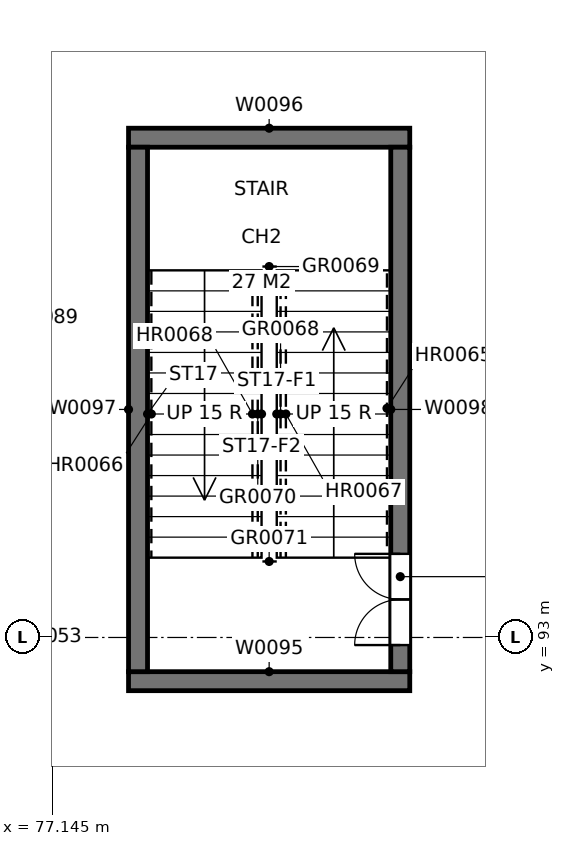
"""IFC4 building model, lengths in metres.
Left out: names, types, materials, properties, quantities, classifications, styles, units other than length and angle.
Written with IfcOpenShell. Run it as: python <this file> out.ifc"""

import sys

from ifc_helpers import new_model, si_unit, direction, frame, frame_2d, origin, place, context, subcontext, project, spatial, rectangle, extrude, element, fill, save


model = new_model("IFC4")
c1 = context("Model", 3, precision=1e-05, world=origin(), true_north=direction((0.0, 1.0)))
c2 = subcontext(c1, "Body", "Model", "MODEL_VIEW")
j1 = project(units=[si_unit("LENGTHUNIT", "METRE"), si_unit("PLANEANGLEUNIT", "RADIAN")], contexts=[c1])
p1 = place(None, origin())
s1 = spatial("IfcSite", under=j1, at=p1, CompositionType="ELEMENT")
p2 = place(p1, origin())
s2 = spatial("IfcBuilding", under=s1, at=p2, CompositionType="ELEMENT")
p3 = place(p2, frame((0.0, 0.0, 9.6)))
s3 = spatial("IfcBuildingStorey", under=s2, at=p3, CompositionType="ELEMENT", Elevation=9.6)
for number, where, z_axis, x_axis in (
    (1, (78.15, 92.425, 0.0), (0.0, 0.0, 1.0), (1.0, 0.0, 0.0)),
    (2, (78.15, 99.575, 0.0), (0.0, 0.0, 1.0), (1.0, 0.0, 0.0)),
):
    element("IfcWall", number, at=place(p3, frame(where, z_axis=z_axis, x_axis=x_axis)), inside=s3, PredefinedType="SOLIDWALL", context=c2, shape_type="SweptSolid", body=[
        extrude(rectangle(XDim=3.7, YDim=0.25, at=frame_2d((1.85, 0.0))), origin(), (0.0, 0.0, 1.0), 4.8),
    ])
p4 = place(p3, frame((78.275, 92.55, 0.0), z_axis=(0.0, 0.0, 1.0), x_axis=(0.0, 1.0, 0.0)))
e3 = element("IfcWall", 3, at=p4, inside=s3, PredefinedType="SOLIDWALL", context=c2, shape_type="SweptSolid", body=[
    extrude(rectangle(XDim=6.9, YDim=0.25, at=frame_2d((3.45, 0.0))), origin(), (0.0, 0.0, 1.0), 4.8),
])
p5 = place(p3, frame((81.725, 92.55, 0.0), z_axis=(0.0, 0.0, 1.0), x_axis=(0.0, 1.0, 0.0)))
e4 = element("IfcWall", 4, at=p5, inside=s3, PredefinedType="SOLIDWALL", context=c2, shape_type="SweptSolid", body=[
    extrude(rectangle(XDim=6.9, YDim=0.25, at=frame_2d((3.45, 0.0))), origin(), (0.0, 0.0, 1.0), 4.8),
])
p6 = place(p5, frame((0.35, 0.0, 0.0)))
e5 = element("IfcOpeningElement", 5, at=p6, cuts=e4, PredefinedType="OPENING", context=c2, shape_type="SweptSolid", body=[
    extrude(rectangle(XDim=1.2, YDim=2.1, at=frame_2d((0.6, 1.05))), frame((0.0, 0.135, 0.0), z_axis=(0.0, -1.0, 0.0), x_axis=(1.0, 0.0, 0.0)), (0.0, 0.0, 1.0), 0.27),
])
p7 = place(p6, origin())
e6 = element("IfcDoor", 6, at=p7, inside=s3, OperationType="DOUBLE_DOOR_SINGLE_SWING", PredefinedType="DOOR", context=c2, shape_type="SweptSolid", body=[
    extrude(rectangle(XDim=1.2, YDim=2.1, at=frame_2d((0.6, 1.05))), frame((0.0, 0.025, 0.0), z_axis=(0.0, -1.0, 0.0), x_axis=(1.0, 0.0, 0.0)), (0.0, 0.0, 1.0), 0.05),
])
fill(e5, e6)
save(model, sys.argv[1])
